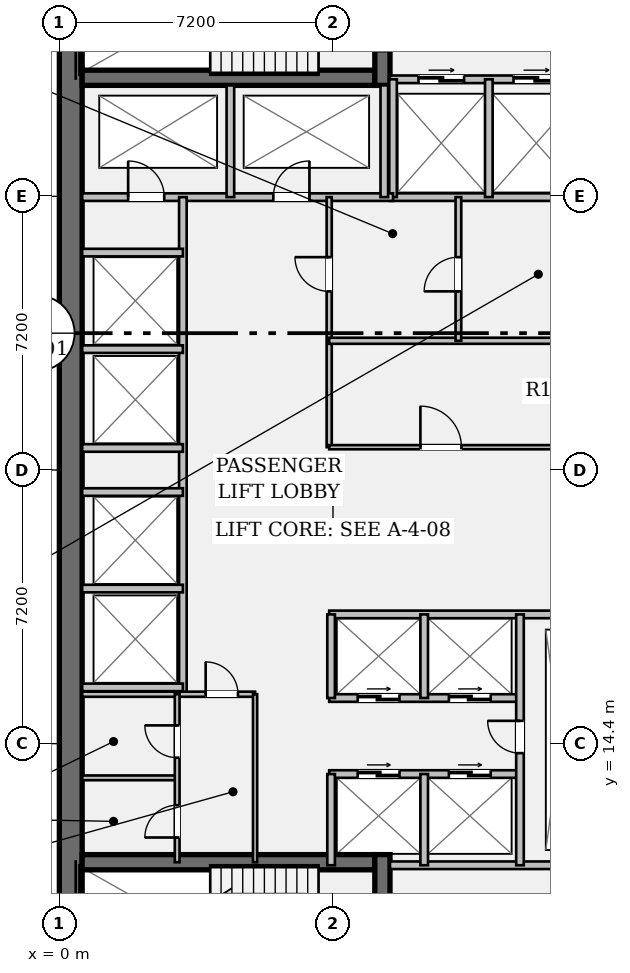
"""IFC4 building model, lengths in metres.
Left out: names, types, materials, properties, quantities, classifications, styles, units other than length and angle.
Written with IfcOpenShell. Run it as: python <this file> out.ifc"""

import sys

from ifc_helpers import new_model, si_unit, direction, frame, frame_2d, origin, place, context, subcontext, project, spatial, rectangle, extrude, element, fill, save


model = new_model("IFC4")
c1 = context("Model", 3, precision=1e-05, world=origin(), true_north=direction((0.0, 1.0)))
c2 = subcontext(c1, "Body", "Model", "MODEL_VIEW")
j1 = project(units=[si_unit("LENGTHUNIT", "METRE"), si_unit("PLANEANGLEUNIT", "RADIAN")], contexts=[c1])
p1 = place(None, origin())
s1 = spatial("IfcSite", under=j1, at=p1, CompositionType="ELEMENT")
p2 = place(p1, origin())
s2 = spatial("IfcBuilding", under=s1, at=p2, CompositionType="ELEMENT")
p3 = place(p2, frame((0.0, 0.0, 133.0)))
s3 = spatial("IfcBuildingStorey", under=s2, at=p3, CompositionType="ELEMENT", Elevation=133.0)
p4 = place(p3, frame((0.3, 7.2, 0.0), z_axis=(0.0, 0.0, 1.0), x_axis=(0.0, 1.0, 0.0)))
e1 = element("IfcWall", 1, at=p4, inside=s3, PredefinedType="SHEAR", context=c2, shape_type="SweptSolid", body=[
    extrude(rectangle(XDim=28.8, YDim=0.6, at=frame_2d((14.4, 0.0))), origin(), (0.0, 0.0, 1.0), 3.58),
])
for number, where, z_axis, x_axis in (
    (2, (0.6, 31.92, 0.0), (0.0, 0.0, 1.0), (1.0, 0.0, 0.0)),
    (3, (0.6, 11.28, 0.0), (0.0, 0.0, 1.0), (1.0, 0.0, 0.0)),
):
    element("IfcWall", number, at=place(p3, frame(where, z_axis=z_axis, x_axis=x_axis)), inside=s3, PredefinedType="SHEAR", context=c2, shape_type="SweptSolid", body=[
        extrude(rectangle(XDim=7.7, YDim=0.4, at=frame_2d((3.85, 0.0))), origin(), (0.0, 0.0, 1.0), 3.58),
    ])
p5 = place(p3, frame((8.5, 31.72, 0.0), z_axis=(0.0, 0.0, 1.0), x_axis=(0.0, 1.0, 0.0)))
e4 = element("IfcWall", 4, at=p5, inside=s3, PredefinedType="SHEAR", context=c2, shape_type="SweptSolid", body=[
    extrude(rectangle(XDim=3.68, YDim=0.4, at=frame_2d((1.84, 0.0))), origin(), (0.0, 0.0, 1.0), 3.58),
])
p6 = place(p5, frame((0.9, 0.0, 0.0)))
e5 = element("IfcOpeningElement", 5, at=p6, cuts=e4, PredefinedType="OPENING", context=c2, shape_type="SweptSolid", body=[
    extrude(rectangle(XDim=1.1, YDim=2.15, at=frame_2d((0.55, 1.075))), frame((0.0, 0.212, 0.0), z_axis=(0.0, -1.0, 0.0), x_axis=(1.0, 0.0, 0.0)), (0.0, 0.0, 1.0), 0.424),
])
p7 = place(p3, frame((8.5, 7.8, 0.0), z_axis=(0.0, 0.0, 1.0), x_axis=(0.0, 1.0, 0.0)))
e6 = element("IfcWall", 6, at=p7, inside=s3, PredefinedType="SHEAR", context=c2, shape_type="SweptSolid", body=[
    extrude(rectangle(XDim=3.68, YDim=0.4, at=frame_2d((1.84, 0.0))), origin(), (0.0, 0.0, 1.0), 3.58),
])
p8 = place(p7, frame((0.85, 0.0, 0.0)))
e7 = element("IfcOpeningElement", 7, at=p8, cuts=e6, PredefinedType="OPENING", context=c2, shape_type="SweptSolid", body=[
    extrude(rectangle(XDim=1.1, YDim=2.15, at=frame_2d((0.55, 1.075))), frame((0.0, 0.212, 0.0), z_axis=(0.0, -1.0, 0.0), x_axis=(1.0, 0.0, 0.0)), (0.0, 0.0, 1.0), 0.424),
])
p9 = place(p3, frame((8.7, 31.88, 0.0), z_axis=(0.0, 0.0, 1.0), x_axis=(1.0, 0.0, 0.0)))
e8 = element("IfcWall", 8, at=p9, inside=s3, PredefinedType="PARTITIONING", context=c2, shape_type="SweptSolid", body=[
    extrude(rectangle(XDim=5.15, YDim=0.2, at=frame_2d((2.575, 0.0))), origin(), (0.0, 0.0, 1.0), 3.58),
])
p10 = place(p9, frame((0.75, 0.0, 0.0)))
e9 = element("IfcOpeningElement", 9, at=p10, cuts=e8, PredefinedType="OPENING", context=c2, shape_type="SweptSolid", body=[
    extrude(rectangle(XDim=1.2, YDim=2.2, at=frame_2d((0.6, 1.1))), frame((0.0, 0.112, 0.0), z_axis=(0.0, -1.0, 0.0), x_axis=(1.0, 0.0, 0.0)), (0.0, 0.0, 1.0), 0.224),
])
p11 = place(p9, frame((3.25, 0.0, 0.0)))
e10 = element("IfcOpeningElement", 10, at=p11, cuts=e8, PredefinedType="OPENING", context=c2, shape_type="SweptSolid", body=[
    extrude(rectangle(XDim=1.2, YDim=2.2, at=frame_2d((0.6, 1.1))), frame((0.0, 0.112, 0.0), z_axis=(0.0, -1.0, 0.0), x_axis=(1.0, 0.0, 0.0)), (0.0, 0.0, 1.0), 0.224),
])
for number, where, z_axis, x_axis in (
    (11, (8.7, 11.2, 0.0), (0.0, 0.0, 1.0), (1.0, 0.0, 0.0)),
    (12, (8.7, 28.78, 0.0), (0.0, 0.0, 1.0), (1.0, 0.0, 0.0)),
):
    element("IfcWall", number, at=place(p3, frame(where, z_axis=z_axis, x_axis=x_axis)), inside=s3, PredefinedType="PARTITIONING", context=c2, shape_type="SweptSolid", body=[
        extrude(rectangle(XDim=5.15, YDim=0.2, at=frame_2d((2.575, 0.0))), origin(), (0.0, 0.0, 1.0), 3.58),
    ])
for number, where, z_axis, x_axis in (
    (13, (8.78, 28.78, 0.0), (0.0, 0.0, 1.0), (0.0, 1.0, 0.0)),
    (14, (11.3, 28.78, 0.0), (0.0, 0.0, 1.0), (0.0, 1.0, 0.0)),
):
    element("IfcWall", number, at=place(p3, frame(where, z_axis=z_axis, x_axis=x_axis)), inside=s3, PredefinedType="PARTITIONING", context=c2, shape_type="SweptSolid", body=[
        extrude(rectangle(XDim=3.1, YDim=0.2, at=frame_2d((1.55, 0.0))), origin(), (0.0, 0.0, 1.0), 3.58),
    ])
p12 = place(p3, frame((0.6, 28.78, 0.0), z_axis=(0.0, 0.0, 1.0), x_axis=(1.0, 0.0, 0.0)))
e15 = element("IfcWall", 15, at=p12, inside=s3, PredefinedType="PARTITIONING", context=c2, shape_type="SweptSolid", body=[
    extrude(rectangle(XDim=8.18, YDim=0.2, at=frame_2d((4.09, 0.0))), origin(), (0.0, 0.0, 1.0), 3.58),
])
p13 = place(p12, frame((1.21, 0.0, 0.0)))
e16 = element("IfcOpeningElement", 16, at=p13, cuts=e15, PredefinedType="OPENING", context=c2, shape_type="SweptSolid", body=[
    extrude(rectangle(XDim=0.95, YDim=2.15, at=frame_2d((0.475, 1.075))), frame((0.0, 0.112, 0.0), z_axis=(0.0, -1.0, 0.0), x_axis=(1.0, 0.0, 0.0)), (0.0, 0.0, 1.0), 0.224),
])
p14 = place(p12, frame((5.03, 0.0, 0.0)))
e17 = element("IfcOpeningElement", 17, at=p14, cuts=e15, PredefinedType="OPENING", context=c2, shape_type="SweptSolid", body=[
    extrude(rectangle(XDim=0.95, YDim=2.15, at=frame_2d((0.475, 1.075))), frame((0.0, 0.112, 0.0), z_axis=(0.0, -1.0, 0.0), x_axis=(1.0, 0.0, 0.0)), (0.0, 0.0, 1.0), 0.224),
])
for number, where, z_axis, x_axis in (
    (18, (4.5, 28.78, 0.0), (0.0, 0.0, 1.0), (0.0, 1.0, 0.0)),
    (19, (8.55, 28.78, 0.0), (0.0, 0.0, 1.0), (0.0, 1.0, 0.0)),
):
    element("IfcWall", number, at=place(p3, frame(where, z_axis=z_axis, x_axis=x_axis)), inside=s3, PredefinedType="PARTITIONING", context=c2, shape_type="SweptSolid", body=[
        extrude(rectangle(XDim=2.94, YDim=0.2, at=frame_2d((1.47, 0.0))), origin(), (0.0, 0.0, 1.0), 3.58),
    ])
p15 = place(p3, frame((3.25, 15.7, 0.0), z_axis=(0.0, 0.0, 1.0), x_axis=(0.0, 1.0, 0.0)))
e20 = element("IfcWall", 20, at=p15, inside=s3, PredefinedType="PARTITIONING", context=c2, shape_type="SweptSolid", body=[
    extrude(rectangle(XDim=13.08, YDim=0.2, at=frame_2d((6.54, 0.0))), origin(), (0.0, 0.0, 1.0), 3.58),
])
for number, where, z_axis, x_axis in (
    (21, (0.6, 15.88, 0.0), (0.0, 0.0, 1.0), (1.0, 0.0, 0.0)),
    (22, (0.6, 18.48, 0.0), (0.0, 0.0, 1.0), (1.0, 0.0, 0.0)),
    (23, (0.6, 22.18, 0.0), (0.0, 0.0, 1.0), (1.0, 0.0, 0.0)),
    (24, (0.6, 24.78, 0.0), (0.0, 0.0, 1.0), (1.0, 0.0, 0.0)),
    (25, (0.6, 21.02, 0.0), (0.0, 0.0, 1.0), (1.0, 0.0, 0.0)),
    (26, (0.6, 27.32, 0.0), (0.0, 0.0, 1.0), (1.0, 0.0, 0.0)),
):
    element("IfcWall", number, at=place(p3, frame(where, z_axis=z_axis, x_axis=x_axis)), inside=s3, PredefinedType="PARTITIONING", context=c2, shape_type="SweptSolid", body=[
        extrude(rectangle(XDim=2.65, YDim=0.2, at=frame_2d((1.325, 0.0))), origin(), (0.0, 0.0, 1.0), 3.58),
    ])
p16 = place(p3, frame((7.1, 22.2, 0.0), z_axis=(0.0, 0.0, 1.0), x_axis=(0.0, 1.0, 0.0)))
e27 = element("IfcWall", 27, at=p16, inside=s3, PredefinedType="PARTITIONING", context=c2, shape_type="SweptSolid", body=[
    extrude(rectangle(XDim=6.58, YDim=0.135, at=frame_2d((3.29, 0.0))), origin(), (0.0, 0.0, 1.0), 3.58),
])
p17 = place(p16, frame((4.1, 0.0, 0.0)))
e28 = element("IfcOpeningElement", 28, at=p17, cuts=e27, PredefinedType="OPENING", context=c2, shape_type="SweptSolid", body=[
    extrude(rectangle(XDim=0.9, YDim=2.15, at=frame_2d((0.45, 1.075))), frame((0.0, 0.08, 0.0), z_axis=(0.0, -1.0, 0.0), x_axis=(1.0, 0.0, 0.0)), (0.0, 0.0, 1.0), 0.159),
])
p18 = place(p3, frame((7.1, 22.2, 0.0), z_axis=(0.0, 0.0, 1.0), x_axis=(1.0, 0.0, 0.0)))
e29 = element("IfcWall", 29, at=p18, inside=s3, PredefinedType="PARTITIONING", context=c2, shape_type="SweptSolid", body=[
    extrude(rectangle(XDim=7.05, YDim=0.11, at=frame_2d((3.525, 0.0))), origin(), (0.0, 0.0, 1.0), 3.58),
])
p19 = place(p18, frame((2.4, 0.0, 0.0)))
e30 = element("IfcOpeningElement", 30, at=p19, cuts=e29, PredefinedType="OPENING", context=c2, shape_type="SweptSolid", body=[
    extrude(rectangle(XDim=1.08, YDim=2.15, at=frame_2d((0.54, 1.075))), frame((0.0, 0.067, 0.0), z_axis=(0.0, -1.0, 0.0), x_axis=(1.0, 0.0, 0.0)), (0.0, 0.0, 1.0), 0.134),
])
p20 = place(p3, frame((7.1, 25.0, 0.0), z_axis=(0.0, 0.0, 1.0), x_axis=(1.0, 0.0, 0.0)))
e31 = element("IfcWall", 31, at=p20, inside=s3, PredefinedType="PARTITIONING", context=c2, shape_type="SweptSolid", body=[
    extrude(rectangle(XDim=7.05, YDim=0.16, at=frame_2d((3.525, 0.0))), origin(), (0.0, 0.0, 1.0), 3.58),
])
p21 = place(p3, frame((10.5, 25.0, 0.0), z_axis=(0.0, 0.0, 1.0), x_axis=(0.0, 1.0, 0.0)))
e32 = element("IfcWall", 32, at=p21, inside=s3, PredefinedType="PARTITIONING", context=c2, shape_type="SweptSolid", body=[
    extrude(rectangle(XDim=3.78, YDim=0.15, at=frame_2d((1.89, 0.0))), origin(), (0.0, 0.0, 1.0), 3.58),
])
p22 = place(p21, frame((1.3, 0.0, 0.0)))
e33 = element("IfcOpeningElement", 33, at=p22, cuts=e32, PredefinedType="OPENING", context=c2, shape_type="SweptSolid", body=[
    extrude(rectangle(XDim=0.9, YDim=2.15, at=frame_2d((0.45, 1.075))), frame((0.0, 0.087, 0.0), z_axis=(0.0, -1.0, 0.0), x_axis=(1.0, 0.0, 0.0)), (0.0, 0.0, 1.0), 0.174),
])
p23 = place(p3, frame((7.1, 17.8, 0.0), z_axis=(0.0, 0.0, 1.0), x_axis=(1.0, 0.0, 0.0)))
e34 = element("IfcWall", 34, at=p23, inside=s3, PredefinedType="PARTITIONING", context=c2, shape_type="SweptSolid", body=[
    extrude(rectangle(XDim=6.75, YDim=0.2, at=frame_2d((3.375, 0.0))), origin(), (0.0, 0.0, 1.0), 3.58),
])
p24 = place(p3, frame((7.1, 15.6, 0.0), z_axis=(0.0, 0.0, 1.0), x_axis=(1.0, 0.0, 0.0)))
e35 = element("IfcWall", 35, at=p24, inside=s3, PredefinedType="PARTITIONING", context=c2, shape_type="SweptSolid", body=[
    extrude(rectangle(XDim=5.02, YDim=0.2, at=frame_2d((2.51, 0.0))), origin(), (0.0, 0.0, 1.0), 3.58),
])
p25 = place(p24, frame((0.75, 0.0, 0.0)))
e36 = element("IfcOpeningElement", 36, at=p25, cuts=e35, PredefinedType="OPENING", context=c2, shape_type="SweptSolid", body=[
    extrude(rectangle(XDim=1.1, YDim=2.2, at=frame_2d((0.55, 1.1))), frame((0.0, 0.112, 0.0), z_axis=(0.0, -1.0, 0.0), x_axis=(1.0, 0.0, 0.0)), (0.0, 0.0, 1.0), 0.224),
])
p26 = place(p24, frame((3.15, 0.0, 0.0)))
e37 = element("IfcOpeningElement", 37, at=p26, cuts=e35, PredefinedType="OPENING", context=c2, shape_type="SweptSolid", body=[
    extrude(rectangle(XDim=1.1, YDim=2.2, at=frame_2d((0.55, 1.1))), frame((0.0, 0.112, 0.0), z_axis=(0.0, -1.0, 0.0), x_axis=(1.0, 0.0, 0.0)), (0.0, 0.0, 1.0), 0.224),
])
p27 = place(p3, frame((7.1, 13.6, 0.0), z_axis=(0.0, 0.0, 1.0), x_axis=(1.0, 0.0, 0.0)))
e38 = element("IfcWall", 38, at=p27, inside=s3, PredefinedType="PARTITIONING", context=c2, shape_type="SweptSolid", body=[
    extrude(rectangle(XDim=5.02, YDim=0.2, at=frame_2d((2.51, 0.0))), origin(), (0.0, 0.0, 1.0), 3.58),
])
p28 = place(p27, frame((0.75, 0.0, 0.0)))
e39 = element("IfcOpeningElement", 39, at=p28, cuts=e38, PredefinedType="OPENING", context=c2, shape_type="SweptSolid", body=[
    extrude(rectangle(XDim=1.1, YDim=2.2, at=frame_2d((0.55, 1.1))), frame((0.0, 0.112, 0.0), z_axis=(0.0, -1.0, 0.0), x_axis=(1.0, 0.0, 0.0)), (0.0, 0.0, 1.0), 0.224),
])
p29 = place(p27, frame((3.15, 0.0, 0.0)))
e40 = element("IfcOpeningElement", 40, at=p29, cuts=e38, PredefinedType="OPENING", context=c2, shape_type="SweptSolid", body=[
    extrude(rectangle(XDim=1.1, YDim=2.2, at=frame_2d((0.55, 1.1))), frame((0.0, 0.112, 0.0), z_axis=(0.0, -1.0, 0.0), x_axis=(1.0, 0.0, 0.0)), (0.0, 0.0, 1.0), 0.224),
])
p30 = place(p3, frame((7.15, 15.6, 0.0), z_axis=(0.0, 0.0, 1.0), x_axis=(0.0, 1.0, 0.0)))
e41 = element("IfcWall", 41, at=p30, inside=s3, PredefinedType="PARTITIONING", context=c2, shape_type="SweptSolid", body=[
    extrude(rectangle(XDim=2.2, YDim=0.2, at=frame_2d((1.1, 0.0))), origin(), (0.0, 0.0, 1.0), 3.58),
])
p31 = place(p3, frame((7.15, 11.2, 0.0), z_axis=(0.0, 0.0, 1.0), x_axis=(0.0, 1.0, 0.0)))
e42 = element("IfcWall", 42, at=p31, inside=s3, PredefinedType="PARTITIONING", context=c2, shape_type="SweptSolid", body=[
    extrude(rectangle(XDim=2.4, YDim=0.2, at=frame_2d((1.2, 0.0))), origin(), (0.0, 0.0, 1.0), 3.58),
])
p32 = place(p3, frame((9.6, 15.6, 0.0), z_axis=(0.0, 0.0, 1.0), x_axis=(0.0, 1.0, 0.0)))
e43 = element("IfcWall", 43, at=p32, inside=s3, PredefinedType="PARTITIONING", context=c2, shape_type="SweptSolid", body=[
    extrude(rectangle(XDim=2.2, YDim=0.2, at=frame_2d((1.1, 0.0))), origin(), (0.0, 0.0, 1.0), 3.58),
])
p33 = place(p3, frame((9.6, 11.2, 0.0), z_axis=(0.0, 0.0, 1.0), x_axis=(0.0, 1.0, 0.0)))
e44 = element("IfcWall", 44, at=p33, inside=s3, PredefinedType="PARTITIONING", context=c2, shape_type="SweptSolid", body=[
    extrude(rectangle(XDim=2.4, YDim=0.2, at=frame_2d((1.2, 0.0))), origin(), (0.0, 0.0, 1.0), 3.58),
])
p34 = place(p3, frame((12.12, 11.2, 0.0), z_axis=(0.0, 0.0, 1.0), x_axis=(0.0, 1.0, 0.0)))
e45 = element("IfcWall", 45, at=p34, inside=s3, PredefinedType="PARTITIONING", context=c2, shape_type="SweptSolid", body=[
    extrude(rectangle(XDim=6.6, YDim=0.2, at=frame_2d((3.3, 0.0))), origin(), (0.0, 0.0, 1.0), 3.58),
])
p35 = place(p34, frame((2.95, 0.0, 0.0)))
e46 = element("IfcOpeningElement", 46, at=p35, cuts=e45, PredefinedType="OPENING", context=c2, shape_type="SweptSolid", body=[
    extrude(rectangle(XDim=0.85, YDim=2.15, at=frame_2d((0.425, 1.075))), frame((0.0, 0.112, 0.0), z_axis=(0.0, -1.0, 0.0), x_axis=(1.0, 0.0, 0.0)), (0.0, 0.0, 1.0), 0.224),
])
p36 = place(p3, frame((0.6, 15.7, 0.0), z_axis=(0.0, 0.0, 1.0), x_axis=(1.0, 0.0, 0.0)))
e47 = element("IfcWall", 47, at=p36, inside=s3, PredefinedType="PARTITIONING", context=c2, shape_type="SweptSolid", body=[
    extrude(rectangle(XDim=4.55, YDim=0.135, at=frame_2d((2.275, 0.0))), origin(), (0.0, 0.0, 1.0), 3.58),
])
p37 = place(p36, frame((3.25, 0.0, 0.0)))
e48 = element("IfcOpeningElement", 48, at=p37, cuts=e47, PredefinedType="OPENING", context=c2, shape_type="SweptSolid", body=[
    extrude(rectangle(XDim=0.85, YDim=2.15, at=frame_2d((0.425, 1.075))), frame((0.0, 0.08, 0.0), z_axis=(0.0, -1.0, 0.0), x_axis=(1.0, 0.0, 0.0)), (0.0, 0.0, 1.0), 0.159),
])
p38 = place(p3, frame((5.15, 11.28, 0.0), z_axis=(0.0, 0.0, 1.0), x_axis=(0.0, 1.0, 0.0)))
e49 = element("IfcWall", 49, at=p38, inside=s3, PredefinedType="PARTITIONING", context=c2, shape_type="SweptSolid", body=[
    extrude(rectangle(XDim=4.42, YDim=0.11, at=frame_2d((2.21, 0.0))), origin(), (0.0, 0.0, 1.0), 3.58),
])
p39 = place(p3, frame((0.6, 13.5, 0.0), z_axis=(0.0, 0.0, 1.0), x_axis=(1.0, 0.0, 0.0)))
e50 = element("IfcWall", 50, at=p39, inside=s3, PredefinedType="PARTITIONING", context=c2, shape_type="SweptSolid", body=[
    extrude(rectangle(XDim=2.5, YDim=0.125, at=frame_2d((1.25, 0.0))), origin(), (0.0, 0.0, 1.0), 3.58),
])
p40 = place(p3, frame((3.1, 11.28, 0.0), z_axis=(0.0, 0.0, 1.0), x_axis=(0.0, 1.0, 0.0)))
e51 = element("IfcWall", 51, at=p40, inside=s3, PredefinedType="PARTITIONING", context=c2, shape_type="SweptSolid", body=[
    extrude(rectangle(XDim=4.42, YDim=0.125, at=frame_2d((2.21, 0.0))), origin(), (0.0, 0.0, 1.0), 3.58),
])
p41 = place(p40, frame((0.65, 0.0, 0.0)))
e52 = element("IfcOpeningElement", 52, at=p41, cuts=e51, PredefinedType="OPENING", context=c2, shape_type="SweptSolid", body=[
    extrude(rectangle(XDim=0.85, YDim=2.15, at=frame_2d((0.425, 1.075))), frame((0.0, 0.074, 0.0), z_axis=(0.0, -1.0, 0.0), x_axis=(1.0, 0.0, 0.0)), (0.0, 0.0, 1.0), 0.149),
])
p42 = place(p40, frame((2.75, 0.0, 0.0)))
e53 = element("IfcOpeningElement", 53, at=p42, cuts=e51, PredefinedType="OPENING", context=c2, shape_type="SweptSolid", body=[
    extrude(rectangle(XDim=0.85, YDim=2.15, at=frame_2d((0.425, 1.075))), frame((0.0, 0.074, 0.0), z_axis=(0.0, -1.0, 0.0), x_axis=(1.0, 0.0, 0.0)), (0.0, 0.0, 1.0), 0.149),
])
p43 = place(p10, origin())
e54 = element("IfcDoor", 54, at=p43, inside=s3, OperationType="DOUBLE_DOOR_SLIDING", PredefinedType="DOOR", context=c2, shape_type="SweptSolid", body=[
    extrude(rectangle(XDim=1.2, YDim=2.2, at=frame_2d((0.6, 1.1))), frame((0.0, 0.025, 0.0), z_axis=(0.0, -1.0, 0.0), x_axis=(1.0, 0.0, 0.0)), (0.0, 0.0, 1.0), 0.05),
])
fill(e9, e54)
p44 = place(p11, origin())
e55 = element("IfcDoor", 55, at=p44, inside=s3, OperationType="DOUBLE_DOOR_SLIDING", PredefinedType="DOOR", context=c2, shape_type="SweptSolid", body=[
    extrude(rectangle(XDim=1.2, YDim=2.2, at=frame_2d((0.6, 1.1))), frame((0.0, 0.025, 0.0), z_axis=(0.0, -1.0, 0.0), x_axis=(1.0, 0.0, 0.0)), (0.0, 0.0, 1.0), 0.05),
])
fill(e10, e55)
p45 = place(p13, origin())
e56 = element("IfcDoor", 56, at=p45, inside=s3, OperationType="SINGLE_SWING_LEFT", PredefinedType="DOOR", context=c2, shape_type="SweptSolid", body=[
    extrude(rectangle(XDim=0.95, YDim=2.15, at=frame_2d((0.475, 1.075))), frame((0.0, 0.025, 0.0), z_axis=(0.0, -1.0, 0.0), x_axis=(1.0, 0.0, 0.0)), (0.0, 0.0, 1.0), 0.05),
])
fill(e16, e56)
p46 = place(p14, origin())
e57 = element("IfcDoor", 57, at=p46, inside=s3, OperationType="SINGLE_SWING_RIGHT", PredefinedType="DOOR", context=c2, shape_type="SweptSolid", body=[
    extrude(rectangle(XDim=0.95, YDim=2.15, at=frame_2d((0.475, 1.075))), frame((0.0, 0.025, 0.0), z_axis=(0.0, -1.0, 0.0), x_axis=(1.0, 0.0, 0.0)), (0.0, 0.0, 1.0), 0.05),
])
fill(e17, e57)
p47 = place(p19, origin())
e58 = element("IfcDoor", 58, at=p47, inside=s3, OperationType="SINGLE_SWING_LEFT", PredefinedType="DOOR", context=c2, shape_type="SweptSolid", body=[
    extrude(rectangle(XDim=1.08, YDim=2.15, at=frame_2d((0.54, 1.075))), frame((0.0, 0.025, 0.0), z_axis=(0.0, -1.0, 0.0), x_axis=(1.0, 0.0, 0.0)), (0.0, 0.0, 1.0), 0.05),
])
fill(e30, e58)
p48 = place(p17, origin())
e59 = element("IfcDoor", 59, at=p48, inside=s3, OperationType="SINGLE_SWING_RIGHT", PredefinedType="DOOR", context=c2, shape_type="SweptSolid", body=[
    extrude(rectangle(XDim=0.9, YDim=2.15, at=frame_2d((0.45, 1.075))), frame((0.0, 0.025, 0.0), z_axis=(0.0, -1.0, 0.0), x_axis=(1.0, 0.0, 0.0)), (0.0, 0.0, 1.0), 0.05),
])
fill(e28, e59)
p49 = place(p22, origin())
e60 = element("IfcDoor", 60, at=p49, inside=s3, OperationType="SINGLE_SWING_LEFT", PredefinedType="DOOR", context=c2, shape_type="SweptSolid", body=[
    extrude(rectangle(XDim=0.9, YDim=2.15, at=frame_2d((0.45, 1.075))), frame((0.0, 0.025, 0.0), z_axis=(0.0, -1.0, 0.0), x_axis=(1.0, 0.0, 0.0)), (0.0, 0.0, 1.0), 0.05),
])
fill(e33, e60)
p50 = place(p35, origin())
e61 = element("IfcDoor", 61, at=p50, inside=s3, OperationType="SINGLE_SWING_RIGHT", PredefinedType="DOOR", context=c2, shape_type="SweptSolid", body=[
    extrude(rectangle(XDim=0.85, YDim=2.15, at=frame_2d((0.425, 1.075))), frame((0.0, 0.025, 0.0), z_axis=(0.0, -1.0, 0.0), x_axis=(1.0, 0.0, 0.0)), (0.0, 0.0, 1.0), 0.05),
])
fill(e46, e61)
p51 = place(p25, origin())
e62 = element("IfcDoor", 62, at=p51, inside=s3, OperationType="DOUBLE_DOOR_SLIDING", PredefinedType="DOOR", context=c2, shape_type="SweptSolid", body=[
    extrude(rectangle(XDim=1.1, YDim=2.2, at=frame_2d((0.55, 1.1))), frame((0.0, 0.025, 0.0), z_axis=(0.0, -1.0, 0.0), x_axis=(1.0, 0.0, 0.0)), (0.0, 0.0, 1.0), 0.05),
])
fill(e36, e62)
p52 = place(p26, origin())
e63 = element("IfcDoor", 63, at=p52, inside=s3, OperationType="DOUBLE_DOOR_SLIDING", PredefinedType="DOOR", context=c2, shape_type="SweptSolid", body=[
    extrude(rectangle(XDim=1.1, YDim=2.2, at=frame_2d((0.55, 1.1))), frame((0.0, 0.025, 0.0), z_axis=(0.0, -1.0, 0.0), x_axis=(1.0, 0.0, 0.0)), (0.0, 0.0, 1.0), 0.05),
])
fill(e37, e63)
p53 = place(p28, origin())
e64 = element("IfcDoor", 64, at=p53, inside=s3, OperationType="DOUBLE_DOOR_SLIDING", PredefinedType="DOOR", context=c2, shape_type="SweptSolid", body=[
    extrude(rectangle(XDim=1.1, YDim=2.2, at=frame_2d((0.55, 1.1))), frame((0.0, 0.025, 0.0), z_axis=(0.0, -1.0, 0.0), x_axis=(1.0, 0.0, 0.0)), (0.0, 0.0, 1.0), 0.05),
])
fill(e39, e64)
p54 = place(p29, origin())
e65 = element("IfcDoor", 65, at=p54, inside=s3, OperationType="DOUBLE_DOOR_SLIDING", PredefinedType="DOOR", context=c2, shape_type="SweptSolid", body=[
    extrude(rectangle(XDim=1.1, YDim=2.2, at=frame_2d((0.55, 1.1))), frame((0.0, 0.025, 0.0), z_axis=(0.0, -1.0, 0.0), x_axis=(1.0, 0.0, 0.0)), (0.0, 0.0, 1.0), 0.05),
])
fill(e40, e65)
p55 = place(p37, origin())
e66 = element("IfcDoor", 66, at=p55, inside=s3, OperationType="SINGLE_SWING_LEFT", PredefinedType="DOOR", context=c2, shape_type="SweptSolid", body=[
    extrude(rectangle(XDim=0.85, YDim=2.15, at=frame_2d((0.425, 1.075))), frame((0.0, 0.025, 0.0), z_axis=(0.0, -1.0, 0.0), x_axis=(1.0, 0.0, 0.0)), (0.0, 0.0, 1.0), 0.05),
])
fill(e48, e66)
p56 = place(p41, origin())
e67 = element("IfcDoor", 67, at=p56, inside=s3, OperationType="SINGLE_SWING_LEFT", PredefinedType="DOOR", context=c2, shape_type="SweptSolid", body=[
    extrude(rectangle(XDim=0.85, YDim=2.15, at=frame_2d((0.425, 1.075))), frame((0.0, 0.025, 0.0), z_axis=(0.0, -1.0, 0.0), x_axis=(1.0, 0.0, 0.0)), (0.0, 0.0, 1.0), 0.05),
])
fill(e52, e67)
p57 = place(p42, origin())
e68 = element("IfcDoor", 68, at=p57, inside=s3, OperationType="SINGLE_SWING_RIGHT", PredefinedType="DOOR", context=c2, shape_type="SweptSolid", body=[
    extrude(rectangle(XDim=0.85, YDim=2.15, at=frame_2d((0.425, 1.075))), frame((0.0, 0.025, 0.0), z_axis=(0.0, -1.0, 0.0), x_axis=(1.0, 0.0, 0.0)), (0.0, 0.0, 1.0), 0.05),
])
fill(e53, e68)
save(model, sys.argv[1])
